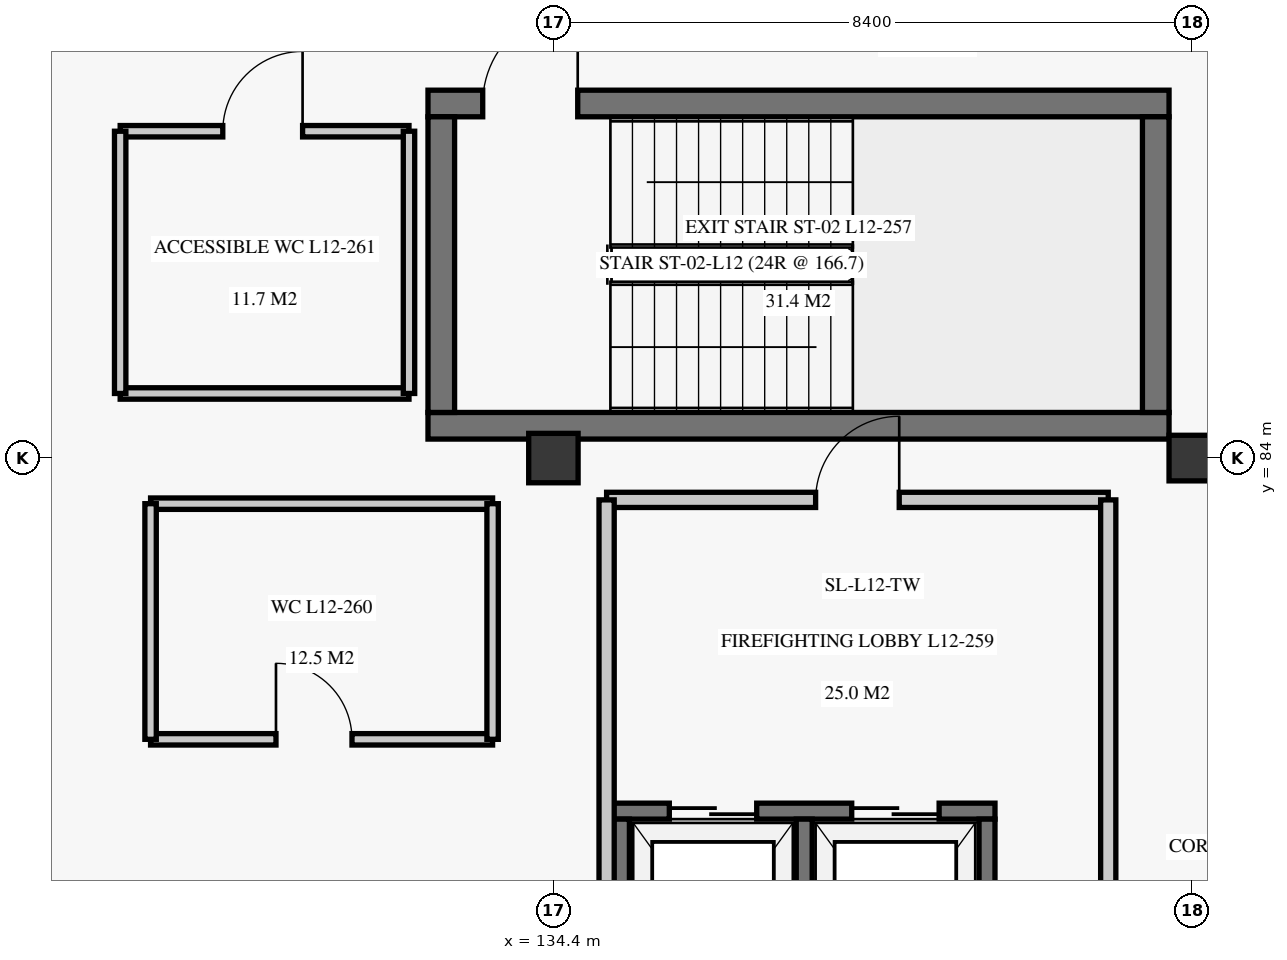
"""IFC4 building model, lengths in metres.
Left out: names, types, materials, properties, quantities, classifications, styles, units other than length and angle.
Written with IfcOpenShell. Run it as: python <this file> out.ifc"""

import sys

from ifc_helpers import new_model, si_unit, direction, frame, frame_2d, origin, origin_2d, place, context, subcontext, project, spatial, rectangle, extrude, element, fill, save


model = new_model("IFC4")
c1 = context("Model", 3, precision=1e-05, world=origin(), true_north=direction((0.0, 1.0)))
c2 = subcontext(c1, "Body", "Model", "MODEL_VIEW")
j1 = project(units=[si_unit("LENGTHUNIT", "METRE"), si_unit("PLANEANGLEUNIT", "RADIAN")], contexts=[c1])
p1 = place(None, origin())
s1 = spatial("IfcSite", under=j1, at=p1, CompositionType="ELEMENT")
p2 = place(p1, origin())
s2 = spatial("IfcBuilding", under=s1, at=p2, CompositionType="ELEMENT")
p3 = place(p2, frame((0.0, 0.0, 50.7)))
s3 = spatial("IfcBuildingStorey", under=s2, at=p3, CompositionType="ELEMENT", Elevation=50.7)
p4 = place(p3, frame((134.4, 84.0, 0.0), z_axis=(0.0, 0.0, 1.0), x_axis=(1.0, 0.0, 0.0)))
e1 = element("IfcColumn", 1, at=p4, inside=s3, PredefinedType="COLUMN", context=c2, shape_type="SweptSolid", body=[
    extrude(rectangle(XDim=0.65, YDim=0.65, at=origin_2d()), origin(), (0.0, 0.0, 1.0), 3.72),
])
p5 = place(p3, frame((142.8, 84.0, 0.0), z_axis=(0.0, 0.0, 1.0), x_axis=(1.0, 0.0, 0.0)))
e2 = element("IfcColumn", 2, at=p5, inside=s3, PredefinedType="COLUMN", context=c2, shape_type="SweptSolid", body=[
    extrude(rectangle(XDim=0.6, YDim=0.6, at=origin_2d()), origin(), (0.0, 0.0, 1.0), 3.72),
])
p6 = place(p3, frame((132.75, 84.425, 0.0), z_axis=(0.0, 0.0, 1.0), x_axis=(1.0, 0.0, 0.0)))
e3 = element("IfcWall", 3, at=p6, inside=s3, PredefinedType="SHEAR", context=c2, shape_type="SweptSolid", body=[
    extrude(rectangle(XDim=9.75, YDim=0.35, at=frame_2d((4.875, 0.0))), origin(), (0.0, 0.0, 1.0), 3.72),
])
p7 = place(p3, frame((132.75, 88.665, 0.0), z_axis=(0.0, 0.0, 1.0), x_axis=(1.0, 0.0, 0.0)))
e4 = element("IfcWall", 4, at=p7, inside=s3, PredefinedType="SHEAR", context=c2, shape_type="SweptSolid", body=[
    extrude(rectangle(XDim=9.75, YDim=0.35, at=frame_2d((4.875, 0.0))), origin(), (0.0, 0.0, 1.0), 3.72),
])
p8 = place(p7, frame((0.72, 0.0, 0.0)))
e5 = element("IfcOpeningElement", 5, at=p8, cuts=e4, PredefinedType="OPENING", context=c2, shape_type="SweptSolid", body=[
    extrude(rectangle(XDim=1.25, YDim=2.2, at=frame_2d((0.625, 1.1))), frame((0.0, 0.185, 0.0), z_axis=(0.0, -1.0, 0.0), x_axis=(1.0, 0.0, 0.0)), (0.0, 0.0, 1.0), 0.37),
])
for number, where, z_axis, x_axis in (
    (6, (132.925, 84.6, 0.0), (0.0, 0.0, 1.0), (0.0, 1.0, 0.0)),
    (7, (142.325, 84.6, 0.0), (0.0, 0.0, 1.0), (0.0, 1.0, 0.0)),
):
    element("IfcWall", number, at=place(p3, frame(where, z_axis=z_axis, x_axis=x_axis)), inside=s3, PredefinedType="SHEAR", context=c2, shape_type="SweptSolid", body=[
        extrude(rectangle(XDim=3.89, YDim=0.35, at=frame_2d((1.945, 0.0))), origin(), (0.0, 0.0, 1.0), 3.72),
    ])
p9 = place(p3, frame((135.19, 79.355, 0.0), z_axis=(0.0, 0.0, 1.0), x_axis=(1.0, 0.0, 0.0)))
e8 = element("IfcWall", 8, at=p9, inside=s3, PredefinedType="SHEAR", context=c2, shape_type="SweptSolid", body=[
    extrude(rectangle(XDim=5.02, YDim=0.21, at=frame_2d((2.51, 0.0))), origin(), (0.0, 0.0, 1.0), 3.72),
])
p10 = place(p9, frame((0.735, 0.0, 0.0)))
e9 = element("IfcOpeningElement", 9, at=p10, cuts=e8, PredefinedType="OPENING", context=c2, shape_type="SweptSolid", body=[
    extrude(rectangle(XDim=1.15, YDim=2.2, at=frame_2d((0.575, 1.1))), frame((0.0, 0.115, 0.0), z_axis=(0.0, -1.0, 0.0), x_axis=(1.0, 0.0, 0.0)), (0.0, 0.0, 1.0), 0.23),
])
p11 = place(p9, frame((3.135, 0.0, 0.0)))
e10 = element("IfcOpeningElement", 10, at=p11, cuts=e8, PredefinedType="OPENING", context=c2, shape_type="SweptSolid", body=[
    extrude(rectangle(XDim=1.15, YDim=2.2, at=frame_2d((0.575, 1.1))), frame((0.0, 0.115, 0.0), z_axis=(0.0, -1.0, 0.0), x_axis=(1.0, 0.0, 0.0)), (0.0, 0.0, 1.0), 0.23),
])
for number, where, z_axis, x_axis in (
    (11, (135.295, 76.25, 0.0), (0.0, 0.0, 1.0), (0.0, 1.0, 0.0)),
    (12, (140.105, 76.25, 0.0), (0.0, 0.0, 1.0), (0.0, 1.0, 0.0)),
    (13, (137.7, 76.25, 0.0), (0.0, 0.0, 1.0), (0.0, 1.0, 0.0)),
):
    element("IfcWall", number, at=place(p3, frame(where, z_axis=z_axis, x_axis=x_axis)), inside=s3, PredefinedType="SHEAR", context=c2, shape_type="SweptSolid", body=[
        extrude(rectangle(XDim=3.0, YDim=0.21, at=frame_2d((1.5, 0.0))), origin(), (0.0, 0.0, 1.0), 3.72),
    ])
p12 = place(p3, frame((135.1, 83.45, 0.0), z_axis=(0.0, 0.0, 1.0), x_axis=(1.0, 0.0, 0.0)))
e14 = element("IfcWall", 14, at=p12, inside=s3, PredefinedType="PARTITIONING", context=c2, shape_type="SweptSolid", body=[
    extrude(rectangle(XDim=6.6, YDim=0.2, at=frame_2d((3.3, 0.0))), origin(), (0.0, 0.0, 1.0), 3.34),
])
p13 = place(p12, frame((2.75, 0.0, 0.0)))
e15 = element("IfcOpeningElement", 15, at=p13, cuts=e14, PredefinedType="OPENING", context=c2, shape_type="SweptSolid", body=[
    extrude(rectangle(XDim=1.1, YDim=2.2, at=frame_2d((0.55, 1.1))), frame((0.0, 0.11, 0.0), z_axis=(0.0, -1.0, 0.0), x_axis=(1.0, 0.0, 0.0)), (0.0, 0.0, 1.0), 0.22),
])
for number, where, z_axis, x_axis in (
    (16, (135.1, 76.2, 0.0), (0.0, 0.0, 1.0), (0.0, 1.0, 0.0)),
    (17, (141.7, 76.2, 0.0), (0.0, 0.0, 1.0), (0.0, 1.0, 0.0)),
):
    element("IfcWall", number, at=place(p3, frame(where, z_axis=z_axis, x_axis=x_axis)), inside=s3, PredefinedType="PARTITIONING", context=c2, shape_type="SweptSolid", body=[
        extrude(rectangle(XDim=7.25, YDim=0.2, at=frame_2d((3.625, 0.0))), origin(), (0.0, 0.0, 1.0), 3.34),
    ])
p14 = place(p3, frame((129.1, 80.3, 0.0), z_axis=(0.0, 0.0, 1.0), x_axis=(1.0, 0.0, 0.0)))
e18 = element("IfcWall", 18, at=p14, inside=s3, PredefinedType="PARTITIONING", context=c2, shape_type="SweptSolid", body=[
    extrude(rectangle(XDim=4.5, YDim=0.15, at=frame_2d((2.25, 0.0))), origin(), (0.0, 0.0, 1.0), 3.34),
])
p15 = place(p14, frame((1.65, 0.0, 0.0)))
e19 = element("IfcOpeningElement", 19, at=p15, cuts=e18, PredefinedType="OPENING", context=c2, shape_type="SweptSolid", body=[
    extrude(rectangle(XDim=1.0, YDim=2.1, at=frame_2d((0.5, 1.05))), frame((0.0, 0.085, 0.0), z_axis=(0.0, -1.0, 0.0), x_axis=(1.0, 0.0, 0.0)), (0.0, 0.0, 1.0), 0.17),
])
p16 = place(p3, frame((129.1, 83.4, 0.0), z_axis=(0.0, 0.0, 1.0), x_axis=(1.0, 0.0, 0.0)))
e20 = element("IfcWall", 20, at=p16, inside=s3, PredefinedType="PARTITIONING", context=c2, shape_type="SweptSolid", body=[
    extrude(rectangle(XDim=4.5, YDim=0.15, at=frame_2d((2.25, 0.0))), origin(), (0.0, 0.0, 1.0), 3.34),
])
for number, where, z_axis, x_axis in (
    (21, (129.1, 80.3, 0.0), (0.0, 0.0, 1.0), (0.0, 1.0, 0.0)),
    (22, (133.6, 80.3, 0.0), (0.0, 0.0, 1.0), (0.0, 1.0, 0.0)),
):
    element("IfcWall", number, at=place(p3, frame(where, z_axis=z_axis, x_axis=x_axis)), inside=s3, PredefinedType="PARTITIONING", context=c2, shape_type="SweptSolid", body=[
        extrude(rectangle(XDim=3.1, YDim=0.15, at=frame_2d((1.55, 0.0))), origin(), (0.0, 0.0, 1.0), 3.34),
    ])
p17 = place(p3, frame((128.7, 88.3, 0.0), z_axis=(0.0, 0.0, 1.0), x_axis=(1.0, 0.0, 0.0)))
e23 = element("IfcWall", 23, at=p17, inside=s3, PredefinedType="PARTITIONING", context=c2, shape_type="SweptSolid", body=[
    extrude(rectangle(XDim=3.8, YDim=0.15, at=frame_2d((1.9, 0.0))), origin(), (0.0, 0.0, 1.0), 3.34),
])
p18 = place(p17, frame((1.35, 0.0, 0.0)))
e24 = element("IfcOpeningElement", 24, at=p18, cuts=e23, PredefinedType="OPENING", context=c2, shape_type="SweptSolid", body=[
    extrude(rectangle(XDim=1.05, YDim=2.15, at=frame_2d((0.525, 1.075))), frame((0.0, 0.085, 0.0), z_axis=(0.0, -1.0, 0.0), x_axis=(1.0, 0.0, 0.0)), (0.0, 0.0, 1.0), 0.17),
])
p19 = place(p3, frame((128.7, 84.85, 0.0), z_axis=(0.0, 0.0, 1.0), x_axis=(1.0, 0.0, 0.0)))
e25 = element("IfcWall", 25, at=p19, inside=s3, PredefinedType="PARTITIONING", context=c2, shape_type="SweptSolid", body=[
    extrude(rectangle(XDim=3.8, YDim=0.15, at=frame_2d((1.9, 0.0))), origin(), (0.0, 0.0, 1.0), 3.34),
])
for number, where, z_axis, x_axis in (
    (26, (128.7, 84.85, 0.0), (0.0, 0.0, 1.0), (0.0, 1.0, 0.0)),
    (27, (132.5, 84.85, 0.0), (0.0, 0.0, 1.0), (0.0, 1.0, 0.0)),
):
    element("IfcWall", number, at=place(p3, frame(where, z_axis=z_axis, x_axis=x_axis)), inside=s3, PredefinedType="PARTITIONING", context=c2, shape_type="SweptSolid", body=[
        extrude(rectangle(XDim=3.45, YDim=0.15, at=frame_2d((1.725, 0.0))), origin(), (0.0, 0.0, 1.0), 3.34),
    ])
p20 = place(p8, origin())
e28 = element("IfcDoor", 28, at=p20, inside=s3, OperationType="SINGLE_SWING_RIGHT", PredefinedType="DOOR", context=c2, shape_type="SweptSolid", body=[
    extrude(rectangle(XDim=1.25, YDim=2.2, at=frame_2d((0.625, 1.1))), frame((0.0, 0.025, 0.0), z_axis=(0.0, -1.0, 0.0), x_axis=(1.0, 0.0, 0.0)), (0.0, 0.0, 1.0), 0.05),
])
fill(e5, e28)
p21 = place(p10, origin())
e29 = element("IfcDoor", 29, at=p21, inside=s3, OperationType="DOUBLE_DOOR_SLIDING", PredefinedType="DOOR", context=c2, shape_type="SweptSolid", body=[
    extrude(rectangle(XDim=1.15, YDim=2.2, at=frame_2d((0.575, 1.1))), frame((0.0, 0.025, 0.0), z_axis=(0.0, -1.0, 0.0), x_axis=(1.0, 0.0, 0.0)), (0.0, 0.0, 1.0), 0.05),
])
fill(e9, e29)
p22 = place(p11, origin())
e30 = element("IfcDoor", 30, at=p22, inside=s3, OperationType="DOUBLE_DOOR_SLIDING", PredefinedType="DOOR", context=c2, shape_type="SweptSolid", body=[
    extrude(rectangle(XDim=1.15, YDim=2.2, at=frame_2d((0.575, 1.1))), frame((0.0, 0.025, 0.0), z_axis=(0.0, -1.0, 0.0), x_axis=(1.0, 0.0, 0.0)), (0.0, 0.0, 1.0), 0.05),
])
fill(e10, e30)
p23 = place(p13, origin())
e31 = element("IfcDoor", 31, at=p23, inside=s3, OperationType="SINGLE_SWING_RIGHT", PredefinedType="DOOR", context=c2, shape_type="SweptSolid", body=[
    extrude(rectangle(XDim=1.1, YDim=2.2, at=frame_2d((0.55, 1.1))), frame((0.0, 0.025, 0.0), z_axis=(0.0, -1.0, 0.0), x_axis=(1.0, 0.0, 0.0)), (0.0, 0.0, 1.0), 0.05),
])
fill(e15, e31)
p24 = place(p15, origin())
e32 = element("IfcDoor", 32, at=p24, inside=s3, OperationType="SINGLE_SWING_LEFT", PredefinedType="DOOR", context=c2, shape_type="SweptSolid", body=[
    extrude(rectangle(XDim=1.0, YDim=2.1, at=frame_2d((0.5, 1.05))), frame((0.0, 0.025, 0.0), z_axis=(0.0, -1.0, 0.0), x_axis=(1.0, 0.0, 0.0)), (0.0, 0.0, 1.0), 0.05),
])
fill(e19, e32)
p25 = place(p18, origin())
e33 = element("IfcDoor", 33, at=p25, inside=s3, OperationType="SINGLE_SWING_RIGHT", PredefinedType="DOOR", context=c2, shape_type="SweptSolid", body=[
    extrude(rectangle(XDim=1.05, YDim=2.15, at=frame_2d((0.525, 1.075))), frame((0.0, 0.025, 0.0), z_axis=(0.0, -1.0, 0.0), x_axis=(1.0, 0.0, 0.0)), (0.0, 0.0, 1.0), 0.05),
])
fill(e24, e33)
save(model, sys.argv[1])
